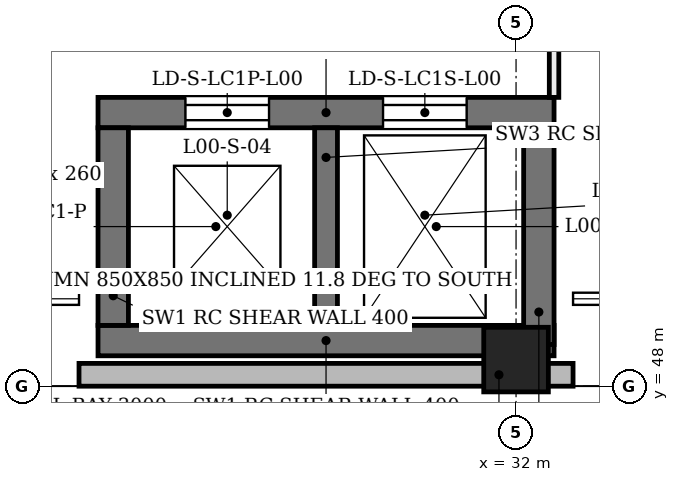
"""IFC4 building model, lengths in metres.
Left out: names, types, materials, properties, quantities, classifications, styles, units other than length and angle.
Written with IfcOpenShell. Run it as: python <this file> out.ifc"""

import sys

from ifc_helpers import new_model, si_unit, direction, frame, frame_2d, origin, origin_2d, place, context, subcontext, project, spatial, rectangle, extrude, element, fill, save


model = new_model("IFC4")
c1 = context("Model", 3, precision=1e-05, world=origin(), true_north=direction((0.0, 1.0)))
c2 = subcontext(c1, "Body", "Model", "MODEL_VIEW")
j1 = project(units=[si_unit("LENGTHUNIT", "METRE"), si_unit("PLANEANGLEUNIT", "RADIAN")], contexts=[c1])
p1 = place(None, origin())
s1 = spatial("IfcSite", under=j1, at=p1, CompositionType="ELEMENT")
p2 = place(p1, origin())
s2 = spatial("IfcBuilding", under=s1, at=p2, CompositionType="ELEMENT")
p3 = place(p2, origin())
s3 = spatial("IfcBuildingStorey", under=s2, at=p3, CompositionType="ELEMENT", Elevation=0.0)
p4 = place(p3, frame((26.5, 48.6, 0.0), z_axis=(0.0, 0.0, 1.0), x_axis=(1.0, 0.0, 0.0)))
e1 = element("IfcWall", 1, at=p4, inside=s3, PredefinedType="SHEAR", context=c2, shape_type="SweptSolid", body=[
    extrude(rectangle(XDim=6.0, YDim=0.4, at=frame_2d((3.0, 0.0))), origin(), (0.0, 0.0, 1.0), 4.58),
])
p5 = place(p3, frame((26.5, 51.6, 0.0), z_axis=(0.0, 0.0, 1.0), x_axis=(1.0, 0.0, 0.0)))
e2 = element("IfcWall", 2, at=p5, inside=s3, PredefinedType="SHEAR", context=c2, shape_type="SweptSolid", body=[
    extrude(rectangle(XDim=6.0, YDim=0.4, at=frame_2d((3.0, 0.0))), origin(), (0.0, 0.0, 1.0), 4.58),
])
p6 = place(p5, frame((1.15, 0.0, 0.0)))
e3 = element("IfcOpeningElement", 3, at=p6, cuts=e2, PredefinedType="OPENING", context=c2, shape_type="SweptSolid", body=[
    extrude(rectangle(XDim=1.1, YDim=2.1, at=frame_2d((0.55, 1.05))), frame((0.0, 0.21, 0.0), z_axis=(0.0, -1.0, 0.0), x_axis=(1.0, 0.0, 0.0)), (0.0, 0.0, 1.0), 0.42),
])
p7 = place(p5, frame((3.75, 0.0, 0.0)))
e4 = element("IfcOpeningElement", 4, at=p7, cuts=e2, PredefinedType="OPENING", context=c2, shape_type="SweptSolid", body=[
    extrude(rectangle(XDim=1.1, YDim=2.1, at=frame_2d((0.55, 1.05))), frame((0.0, 0.21, 0.0), z_axis=(0.0, -1.0, 0.0), x_axis=(1.0, 0.0, 0.0)), (0.0, 0.0, 1.0), 0.42),
])
p8 = place(p3, frame((26.7, 48.8, 0.0), z_axis=(0.0, 0.0, 1.0), x_axis=(0.0, 1.0, 0.0)))
e5 = element("IfcWall", 5, at=p8, inside=s3, PredefinedType="SHEAR", context=c2, shape_type="SweptSolid", body=[
    extrude(rectangle(XDim=2.6, YDim=0.4, at=frame_2d((1.3, 0.0))), origin(), (0.0, 0.0, 1.0), 4.58),
])
p9 = place(p3, frame((32.3, 48.548, 0.0), z_axis=(0.0, 0.0, 1.0), x_axis=(0.0, 1.0, 0.0)))
e6 = element("IfcWall", 6, at=p9, inside=s3, PredefinedType="SHEAR", context=c2, shape_type="SweptSolid", body=[
    extrude(rectangle(XDim=2.852, YDim=0.4, at=frame_2d((1.426, 0.0))), origin(), (0.0, 0.0, 1.0), 4.58),
])
p10 = place(p3, frame((29.5, 48.8, 0.0), z_axis=(0.0, 0.0, 1.0), x_axis=(0.0, 1.0, 0.0)))
e7 = element("IfcWall", 7, at=p10, inside=s3, PredefinedType="SHEAR", context=c2, shape_type="SweptSolid", body=[
    extrude(rectangle(XDim=2.6, YDim=0.3, at=frame_2d((1.3, 0.0))), origin(), (0.0, 0.0, 1.0), 4.58),
])
p11 = place(p3, frame((32.0, 48.6, 0.0), z_axis=(0.0, -0.203952265704, 0.978980833987), x_axis=(1.0, 0.0, 0.0)))
e8 = element("IfcColumn", 8, at=p11, inside=s3, PredefinedType="COLUMN", context=c2, shape_type="SweptSolid", body=[
    extrude(rectangle(XDim=0.85, YDim=0.85, at=origin_2d()), origin(), (0.0, 0.0, 1.0), 4.903),
])
p12 = place(p3, frame((26.25, 48.15, 0.0), z_axis=(0.0, 0.0, 1.0), x_axis=(1.0, 0.0, 0.0)))
e9 = element("IfcWall", 9, at=p12, inside=s3, PredefinedType="SOLIDWALL", context=c2, shape_type="SweptSolid", body=[
    extrude(rectangle(XDim=6.5, YDim=0.3, at=frame_2d((3.25, 0.0))), origin(), (0.0, 0.0, 1.0), 3.9),
])
p13 = place(p3, frame((32.5, 51.8, 0.0), z_axis=(0.0, 0.0, 1.0), x_axis=(0.0, 1.0, 0.0)))
e10 = element("IfcWall", 10, at=p13, inside=s3, PredefinedType="PARTITIONING", context=c2, shape_type="SweptSolid", body=[
    extrude(rectangle(XDim=5.15, YDim=0.125, at=frame_2d((2.575, 0.0))), origin(), (0.0, 0.0, 1.0), 4.08),
])
p14 = place(p6, origin())
e11 = element("IfcDoor", 11, at=p14, inside=s3, OperationType="DOUBLE_DOOR_SLIDING", PredefinedType="DOOR", context=c2, shape_type="SweptSolid", body=[
    extrude(rectangle(XDim=1.1, YDim=2.1, at=frame_2d((0.55, 1.05))), frame((0.0, 0.025, 0.0), z_axis=(0.0, -1.0, 0.0), x_axis=(1.0, 0.0, 0.0)), (0.0, 0.0, 1.0), 0.05),
])
fill(e3, e11)
p15 = place(p7, origin())
e12 = element("IfcDoor", 12, at=p15, inside=s3, OperationType="DOUBLE_DOOR_SLIDING", PredefinedType="DOOR", context=c2, shape_type="SweptSolid", body=[
    extrude(rectangle(XDim=1.1, YDim=2.1, at=frame_2d((0.55, 1.05))), frame((0.0, 0.025, 0.0), z_axis=(0.0, -1.0, 0.0), x_axis=(1.0, 0.0, 0.0)), (0.0, 0.0, 1.0), 0.05),
])
fill(e4, e12)
save(model, sys.argv[1])
